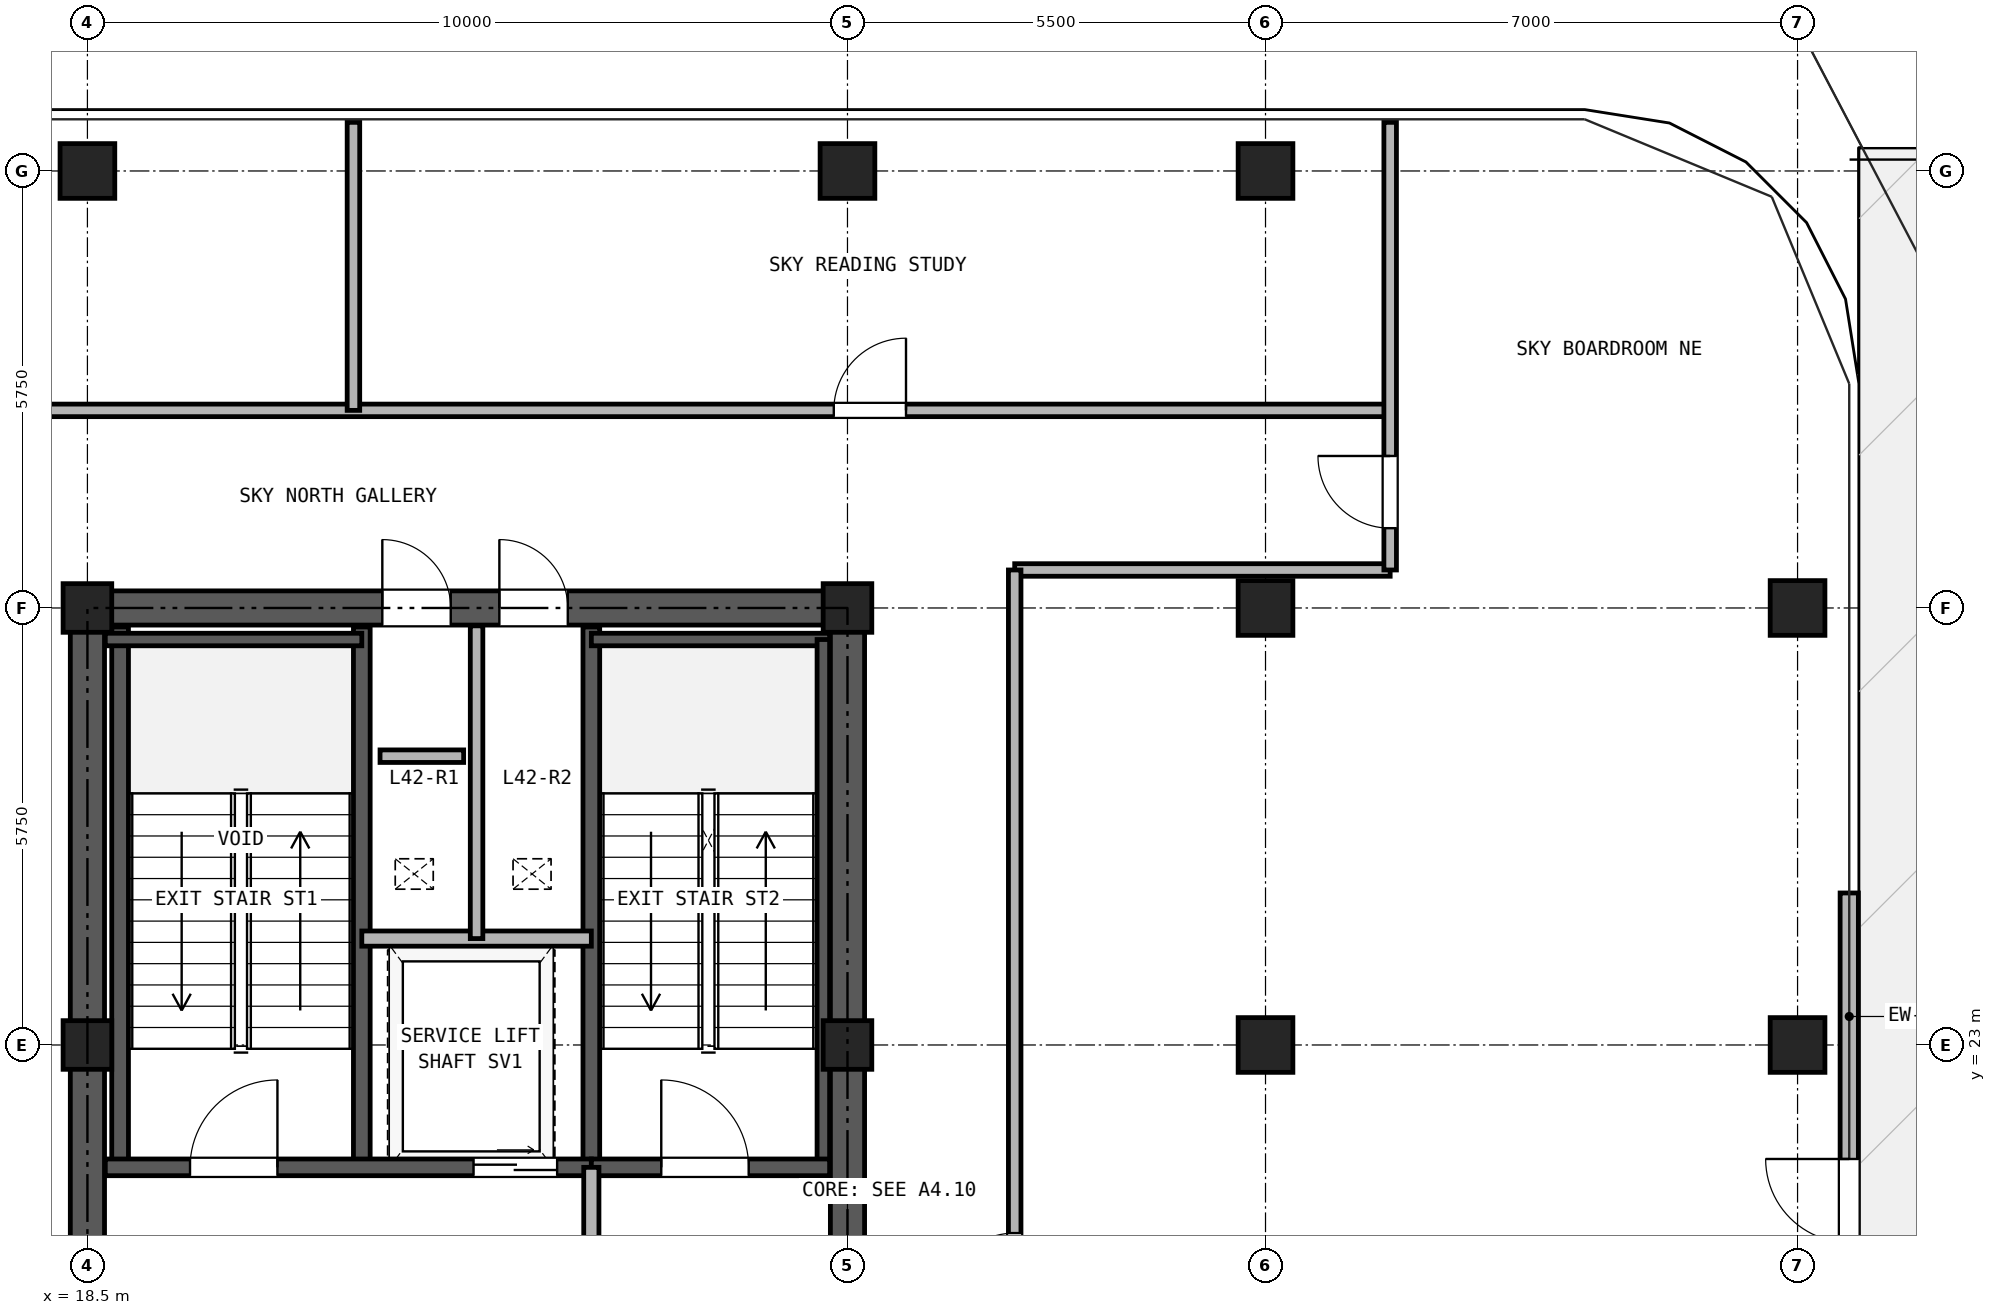
"""IFC4 building model, lengths in metres.
Left out: names, types, materials, properties, quantities, classifications, styles, units other than length and angle.
Written with IfcOpenShell. Run it as: python <this file> out.ifc"""

import sys

from ifc_helpers import new_model, si_unit, direction, frame, frame_2d, origin, origin_2d, place, context, subcontext, project, spatial, rectangle, hollow_rectangle, extrude, source, transform, mapped, element, fill, save


model = new_model("IFC4")
c1 = context("Model", 3, precision=1e-05, world=origin(), true_north=direction((0.0, 1.0)))
c2 = subcontext(c1, "Body", "Model", "MODEL_VIEW")
j1 = project(units=[si_unit("LENGTHUNIT", "METRE"), si_unit("PLANEANGLEUNIT", "RADIAN")], contexts=[c1])
p1 = place(None, origin())
s1 = spatial("IfcSite", under=j1, at=p1, CompositionType="ELEMENT")
p2 = place(p1, origin())
s2 = spatial("IfcBuilding", under=s1, at=p2, CompositionType="ELEMENT")
p3 = place(p2, frame((0.0, 0.0, 151.6)))
s3 = spatial("IfcBuildingStorey", under=s2, at=p3, CompositionType="ELEMENT", Elevation=151.6)
m1 = source(origin(), c2, "Body", "SweptSolid", [
    extrude(hollow_rectangle(XDim=0.72, YDim=0.72, WallThickness=0.04, at=origin_2d()), origin(), (0.0, 0.0, 1.0), 4.25),
])
for number, where, z_axis, x_axis in (
    (1, (18.5, 34.5, 0.0), (0.0, 0.0, 1.0), (1.0, 0.0, 0.0)),
    (2, (28.5, 34.5, 0.0), (0.0, 0.0, 1.0), (1.0, 0.0, 0.0)),
    (3, (34.0, 34.5, 0.0), (0.0, 0.0, 1.0), (1.0, 0.0, 0.0)),
    (4, (41.0, 23.0, 0.0), (0.0, 0.0, 1.0), (1.0, 0.0, 0.0)),
    (5, (41.0, 28.75, 0.0), (0.0, 0.0, 1.0), (1.0, 0.0, 0.0)),
):
    element("IfcColumn", number, at=place(p3, frame(where, z_axis=z_axis, x_axis=x_axis)), inside=s3, PredefinedType="COLUMN", context=c2, shape_type="MappedRepresentation", body=[
        mapped(m1, transform((0.0, 0.0, 0.0), x_axis=(1.0, 0.0, 0.0), y_axis=(0.0, 1.0, 0.0), z_axis=(0.0, 0.0, 1.0), scale=1.0)),
    ])
m2 = source(origin(), c2, "Body", "SweptSolid", [
    extrude(hollow_rectangle(XDim=0.64, YDim=0.64, WallThickness=0.035, at=origin_2d()), origin(), (0.0, 0.0, 1.0), 4.25),
])
for number, where, z_axis, x_axis in (
    (6, (18.5, 23.0, 0.0), (0.0, 0.0, 1.0), (1.0, 0.0, 0.0)),
    (7, (18.5, 28.75, 0.0), (0.0, 0.0, 1.0), (1.0, 0.0, 0.0)),
    (8, (28.5, 23.0, 0.0), (0.0, 0.0, 1.0), (1.0, 0.0, 0.0)),
    (9, (28.5, 28.75, 0.0), (0.0, 0.0, 1.0), (1.0, 0.0, 0.0)),
):
    element("IfcColumn", number, at=place(p3, frame(where, z_axis=z_axis, x_axis=x_axis)), inside=s3, PredefinedType="COLUMN", context=c2, shape_type="MappedRepresentation", body=[
        mapped(m2, transform((0.0, 0.0, 0.0), x_axis=(1.0, 0.0, 0.0), y_axis=(0.0, 1.0, 0.0), z_axis=(0.0, 0.0, 1.0), scale=1.0)),
    ])
for number, where, z_axis, x_axis in (
    (10, (34.0, 23.0, 0.0), (0.0, 0.0, 1.0), (1.0, 0.0, 0.0)),
    (11, (34.0, 28.75, 0.0), (0.0, 0.0, 1.0), (1.0, 0.0, 0.0)),
):
    element("IfcColumn", number, at=place(p3, frame(where, z_axis=z_axis, x_axis=x_axis)), inside=s3, PredefinedType="COLUMN", context=c2, shape_type="MappedRepresentation", body=[
        mapped(m1, transform((0.0, 0.0, 0.0), x_axis=(1.0, 0.0, 0.0), y_axis=(0.0, 1.0, 0.0), z_axis=(0.0, 0.0, 1.0), scale=1.0)),
    ])
p4 = place(p3, frame((41.68, 16.0, 0.0), z_axis=(0.0, 0.0, 1.0), x_axis=(0.0, 1.0, 0.0)))
e12 = element("IfcWall", 12, at=p4, inside=s3, PredefinedType="SOLIDWALL", context=c2, shape_type="SweptSolid", body=[
    extrude(rectangle(XDim=9.0, YDim=0.24, at=frame_2d((4.5, 0.0))), origin(), (0.0, 0.0, 1.0), 4.25),
])
p5 = place(p4, frame((1.8, 0.0, 0.0)))
e13 = element("IfcOpeningElement", 13, at=p5, cuts=e12, PredefinedType="OPENING", context=c2, shape_type="SweptSolid", body=[
    extrude(rectangle(XDim=1.1, YDim=2.2, at=frame_2d((0.55, 1.1))), frame((0.0, 0.13, 0.0), z_axis=(0.0, -1.0, 0.0), x_axis=(1.0, 0.0, 0.0)), (0.0, 0.0, 1.0), 0.26),
])
p6 = place(p4, frame((4.4, 0.0, 0.0)))
e14 = element("IfcOpeningElement", 14, at=p6, cuts=e12, PredefinedType="OPENING", context=c2, shape_type="SweptSolid", body=[
    extrude(rectangle(XDim=1.1, YDim=2.2, at=frame_2d((0.55, 1.1))), frame((0.0, 0.13, 0.0), z_axis=(0.0, -1.0, 0.0), x_axis=(1.0, 0.0, 0.0)), (0.0, 0.0, 1.0), 0.26),
])
p7 = place(p3, frame((18.275, 28.75, 0.0), z_axis=(0.0, 0.0, 1.0), x_axis=(1.0, 0.0, 0.0)))
e15 = element("IfcWall", 15, at=p7, inside=s3, PredefinedType="SHEAR", context=c2, shape_type="SweptSolid", body=[
    extrude(rectangle(XDim=10.45, YDim=0.45, at=frame_2d((5.225, 0.0))), origin(), (0.0, 0.0, 1.0), 4.25),
])
p8 = place(p7, frame((4.105, 0.0, 0.0)))
e16 = element("IfcOpeningElement", 16, at=p8, cuts=e15, PredefinedType="OPENING", context=c2, shape_type="SweptSolid", body=[
    extrude(rectangle(XDim=0.9, YDim=2.05, at=frame_2d((0.45, 1.025))), frame((0.0, 0.235, 0.0), z_axis=(0.0, -1.0, 0.0), x_axis=(1.0, 0.0, 0.0)), (0.0, 0.0, 1.0), 0.47),
])
p9 = place(p7, frame((5.645, 0.0, 0.0)))
e17 = element("IfcOpeningElement", 17, at=p9, cuts=e15, PredefinedType="OPENING", context=c2, shape_type="SweptSolid", body=[
    extrude(rectangle(XDim=0.9, YDim=2.05, at=frame_2d((0.45, 1.025))), frame((0.0, 0.235, 0.0), z_axis=(0.0, -1.0, 0.0), x_axis=(1.0, 0.0, 0.0)), (0.0, 0.0, 1.0), 0.47),
])
p10 = place(p3, frame((18.5, 11.725, 0.0), z_axis=(0.0, 0.0, 1.0), x_axis=(0.0, 1.0, 0.0)))
e18 = element("IfcWall", 18, at=p10, inside=s3, PredefinedType="SHEAR", context=c2, shape_type="SweptSolid", body=[
    extrude(rectangle(XDim=16.8, YDim=0.45, at=frame_2d((8.4, 0.0))), origin(), (0.0, 0.0, 1.0), 4.25),
])
p11 = place(p10, frame((7.425, 0.0, 0.0)))
e19 = element("IfcOpeningElement", 19, at=p11, cuts=e18, PredefinedType="OPENING", context=c2, shape_type="SweptSolid", body=[
    extrude(rectangle(XDim=1.15, YDim=2.2, at=frame_2d((0.575, 1.1))), frame((0.0, 0.235, 0.0), z_axis=(0.0, -1.0, 0.0), x_axis=(1.0, 0.0, 0.0)), (0.0, 0.0, 1.0), 0.47),
])
p12 = place(p3, frame((28.5, 11.725, 0.0), z_axis=(0.0, 0.0, 1.0), x_axis=(0.0, 1.0, 0.0)))
e20 = element("IfcWall", 20, at=p12, inside=s3, PredefinedType="SHEAR", context=c2, shape_type="SweptSolid", body=[
    extrude(rectangle(XDim=16.8, YDim=0.45, at=frame_2d((8.4, 0.0))), origin(), (0.0, 0.0, 1.0), 4.25),
])
p13 = place(p12, frame((7.425, 0.0, 0.0)))
e21 = element("IfcOpeningElement", 21, at=p13, cuts=e20, PredefinedType="OPENING", context=c2, shape_type="SweptSolid", body=[
    extrude(rectangle(XDim=1.15, YDim=2.2, at=frame_2d((0.575, 1.1))), frame((0.0, 0.235, 0.0), z_axis=(0.0, -1.0, 0.0), x_axis=(1.0, 0.0, 0.0)), (0.0, 0.0, 1.0), 0.47),
])
for number, where, z_axis, x_axis in (
    (22, (18.93, 21.39, 0.0), (0.0, 0.0, 1.0), (0.0, 1.0, 0.0)),
    (23, (22.11, 21.39, 0.0), (0.0, 0.0, 1.0), (0.0, 1.0, 0.0)),
    (24, (25.13, 21.39, 0.0), (0.0, 0.0, 1.0), (0.0, 1.0, 0.0)),
):
    element("IfcWall", number, at=place(p3, frame(where, z_axis=z_axis, x_axis=x_axis)), inside=s3, PredefinedType="SOLIDWALL", context=c2, shape_type="SweptSolid", body=[
        extrude(rectangle(XDim=7.11, YDim=0.22, at=frame_2d((3.555, 0.0))), origin(), (0.0, 0.0, 1.0), 4.25),
    ])
p14 = place(p3, frame((18.735, 28.335, 0.0), z_axis=(0.0, 0.0, 1.0), x_axis=(1.0, 0.0, 0.0)))
e25 = element("IfcWall", 25, at=p14, inside=s3, PredefinedType="PARTITIONING", context=c2, shape_type="SweptSolid", body=[
    extrude(rectangle(XDim=3.375, YDim=0.165, at=frame_2d((1.688, 0.0))), origin(), (0.0, 0.0, 1.0), 4.25),
])
p15 = place(p3, frame((25.13, 28.335, 0.0), z_axis=(0.0, 0.0, 1.0), x_axis=(1.0, 0.0, 0.0)))
e26 = element("IfcWall", 26, at=p15, inside=s3, PredefinedType="PARTITIONING", context=c2, shape_type="SweptSolid", body=[
    extrude(rectangle(XDim=3.135, YDim=0.165, at=frame_2d((1.567, 0.0))), origin(), (0.0, 0.0, 1.0), 4.25),
])
p16 = place(p3, frame((28.183, 21.39, 0.0), z_axis=(0.0, 0.0, 1.0), x_axis=(0.0, 1.0, 0.0)))
e27 = element("IfcWall", 27, at=p16, inside=s3, PredefinedType="PARTITIONING", context=c2, shape_type="SweptSolid", body=[
    extrude(rectangle(XDim=6.945, YDim=0.165, at=frame_2d((3.473, 0.0))), origin(), (0.0, 0.0, 1.0), 4.25),
])
p17 = place(p3, frame((18.735, 21.39, 0.0), z_axis=(0.0, 0.0, 1.0), x_axis=(1.0, 0.0, 0.0)))
e28 = element("IfcWall", 28, at=p17, inside=s3, PredefinedType="SOLIDWALL", context=c2, shape_type="SweptSolid", body=[
    extrude(rectangle(XDim=6.395, YDim=0.22, at=frame_2d((3.197, 0.0))), origin(), (0.0, 0.0, 1.0), 4.25),
])
p18 = place(p17, frame((1.115, 0.0, 0.0)))
e29 = element("IfcOpeningElement", 29, at=p18, cuts=e28, PredefinedType="OPENING", context=c2, shape_type="SweptSolid", body=[
    extrude(rectangle(XDim=1.15, YDim=2.2, at=frame_2d((0.575, 1.1))), frame((0.0, 0.12, 0.0), z_axis=(0.0, -1.0, 0.0), x_axis=(1.0, 0.0, 0.0)), (0.0, 0.0, 1.0), 0.24),
])
p19 = place(p17, frame((4.845, 0.0, 0.0)))
e30 = element("IfcOpeningElement", 30, at=p19, cuts=e28, PredefinedType="OPENING", context=c2, shape_type="SweptSolid", body=[
    extrude(rectangle(XDim=1.1, YDim=2.25, at=frame_2d((0.55, 1.125))), frame((0.0, 0.12, 0.0), z_axis=(0.0, -1.0, 0.0), x_axis=(1.0, 0.0, 0.0)), (0.0, 0.0, 1.0), 0.24),
])
p20 = place(p3, frame((25.13, 21.39, 0.0), z_axis=(0.0, 0.0, 1.0), x_axis=(1.0, 0.0, 0.0)))
e31 = element("IfcWall", 31, at=p20, inside=s3, PredefinedType="SOLIDWALL", context=c2, shape_type="SweptSolid", body=[
    extrude(rectangle(XDim=3.135, YDim=0.22, at=frame_2d((1.567, 0.0))), origin(), (0.0, 0.0, 1.0), 4.25),
])
p21 = place(p20, frame((0.92, 0.0, 0.0)))
e32 = element("IfcOpeningElement", 32, at=p21, cuts=e31, PredefinedType="OPENING", context=c2, shape_type="SweptSolid", body=[
    extrude(rectangle(XDim=1.15, YDim=2.2, at=frame_2d((0.575, 1.1))), frame((0.0, 0.12, 0.0), z_axis=(0.0, -1.0, 0.0), x_axis=(1.0, 0.0, 0.0)), (0.0, 0.0, 1.0), 0.24),
])
p22 = place(p3, frame((22.11, 24.4, 0.0), z_axis=(0.0, 0.0, 1.0), x_axis=(1.0, 0.0, 0.0)))
e33 = element("IfcWall", 33, at=p22, inside=s3, PredefinedType="PARTITIONING", context=c2, shape_type="SweptSolid", body=[
    extrude(rectangle(XDim=3.02, YDim=0.2, at=frame_2d((1.51, 0.0))), origin(), (0.0, 0.0, 1.0), 4.25),
])
p23 = place(p3, frame((23.62, 24.4, 0.0), z_axis=(0.0, 0.0, 1.0), x_axis=(0.0, 1.0, 0.0)))
e34 = element("IfcWall", 34, at=p23, inside=s3, PredefinedType="PARTITIONING", context=c2, shape_type="SweptSolid", body=[
    extrude(rectangle(XDim=4.115, YDim=0.165, at=frame_2d((2.058, 0.0))), origin(), (0.0, 0.0, 1.0), 4.25),
])
p24 = place(p3, frame((25.13, 18.0, 0.0), z_axis=(0.0, 0.0, 1.0), x_axis=(0.0, 1.0, 0.0)))
e35 = element("IfcWall", 35, at=p24, inside=s3, PredefinedType="PARTITIONING", context=c2, shape_type="SweptSolid", body=[
    extrude(rectangle(XDim=3.39, YDim=0.2, at=frame_2d((1.695, 0.0))), origin(), (0.0, 0.0, 1.0), 4.25),
])
p25 = place(p24, frame((1.1, 0.0, 0.0)))
e36 = element("IfcOpeningElement", 36, at=p25, cuts=e35, PredefinedType="OPENING", context=c2, shape_type="SweptSolid", body=[
    extrude(rectangle(XDim=1.15, YDim=2.2, at=frame_2d((0.575, 1.1))), frame((0.0, 0.11, 0.0), z_axis=(0.0, -1.0, 0.0), x_axis=(1.0, 0.0, 0.0)), (0.0, 0.0, 1.0), 0.22),
])
p26 = place(p3, frame((8.0, 31.35, 0.0), z_axis=(0.0, 0.0, 1.0), x_axis=(1.0, 0.0, 0.0)))
e37 = element("IfcWall", 37, at=p26, inside=s3, PredefinedType="PARTITIONING", context=c2, shape_type="SweptSolid", body=[
    extrude(rectangle(XDim=27.64, YDim=0.165, at=frame_2d((13.82, 0.0))), origin(), (0.0, 0.0, 1.0), 4.25),
])
p27 = place(p26, frame((6.5, 0.0, 0.0)))
e38 = element("IfcOpeningElement", 38, at=p27, cuts=e37, PredefinedType="OPENING", context=c2, shape_type="SweptSolid", body=[
    extrude(rectangle(XDim=1.0, YDim=2.15, at=frame_2d((0.5, 1.075))), frame((0.0, 0.093, 0.0), z_axis=(0.0, -1.0, 0.0), x_axis=(1.0, 0.0, 0.0)), (0.0, 0.0, 1.0), 0.185),
])
p28 = place(p26, frame((20.32, 0.0, 0.0)))
e39 = element("IfcOpeningElement", 39, at=p28, cuts=e37, PredefinedType="OPENING", context=c2, shape_type="SweptSolid", body=[
    extrude(rectangle(XDim=0.95, YDim=2.15, at=frame_2d((0.475, 1.075))), frame((0.0, 0.093, 0.0), z_axis=(0.0, -1.0, 0.0), x_axis=(1.0, 0.0, 0.0)), (0.0, 0.0, 1.0), 0.185),
])
p29 = place(p3, frame((30.7, 29.25, 0.0), z_axis=(0.0, 0.0, 1.0), x_axis=(1.0, 0.0, 0.0)))
e40 = element("IfcWall", 40, at=p29, inside=s3, PredefinedType="PARTITIONING", context=c2, shape_type="SweptSolid", body=[
    extrude(rectangle(XDim=4.94, YDim=0.165, at=frame_2d((2.47, 0.0))), origin(), (0.0, 0.0, 1.0), 4.25),
])
p30 = place(p3, frame((30.7, 10.9, 0.0), z_axis=(0.0, 0.0, 1.0), x_axis=(0.0, 1.0, 0.0)))
e41 = element("IfcWall", 41, at=p30, inside=s3, PredefinedType="PARTITIONING", context=c2, shape_type="SweptSolid", body=[
    extrude(rectangle(XDim=18.35, YDim=0.165, at=frame_2d((9.175, 0.0))), origin(), (0.0, 0.0, 1.0), 4.25),
])
p31 = place(p30, frame((8.675, 0.0, 0.0)))
e42 = element("IfcOpeningElement", 42, at=p31, cuts=e41, PredefinedType="OPENING", context=c2, shape_type="SweptSolid", body=[
    extrude(rectangle(XDim=0.95, YDim=2.15, at=frame_2d((0.475, 1.075))), frame((0.0, 0.093, 0.0), z_axis=(0.0, -1.0, 0.0), x_axis=(1.0, 0.0, 0.0)), (0.0, 0.0, 1.0), 0.185),
])
p32 = place(p3, frame((35.64, 29.25, 0.0), z_axis=(0.0, 0.0, 1.0), x_axis=(0.0, 1.0, 0.0)))
e43 = element("IfcWall", 43, at=p32, inside=s3, PredefinedType="PARTITIONING", context=c2, shape_type="SweptSolid", body=[
    extrude(rectangle(XDim=5.89, YDim=0.165, at=frame_2d((2.945, 0.0))), origin(), (0.0, 0.0, 1.0), 4.25),
])
p33 = place(p32, frame((0.55, 0.0, 0.0)))
e44 = element("IfcOpeningElement", 44, at=p33, cuts=e43, PredefinedType="OPENING", context=c2, shape_type="SweptSolid", body=[
    extrude(rectangle(XDim=0.95, YDim=2.15, at=frame_2d((0.475, 1.075))), frame((0.0, 0.093, 0.0), z_axis=(0.0, -1.0, 0.0), x_axis=(1.0, 0.0, 0.0)), (0.0, 0.0, 1.0), 0.185),
])
p34 = place(p3, frame((22.0, 31.35, 0.0), z_axis=(0.0, 0.0, 1.0), x_axis=(0.0, 1.0, 0.0)))
e45 = element("IfcWall", 45, at=p34, inside=s3, PredefinedType="PARTITIONING", context=c2, shape_type="SweptSolid", body=[
    extrude(rectangle(XDim=3.79, YDim=0.165, at=frame_2d((1.895, 0.0))), origin(), (0.0, 0.0, 1.0), 4.25),
])
p35 = place(p3, frame((22.35, 26.8, 0.0), z_axis=(0.0, 0.0, 1.0), x_axis=(1.0, 0.0, 0.0)))
e46 = element("IfcWall", 46, at=p35, inside=s3, PredefinedType="PARTITIONING", context=c2, shape_type="SweptSolid", body=[
    extrude(rectangle(XDim=1.1, YDim=0.165, at=frame_2d((0.55, 0.0))), origin(), (0.0, 0.0, 1.0), 4.25),
])
p36 = place(p6, frame((1.1, 0.0, 0.0), z_axis=(0.0, 0.0, 1.0), x_axis=(-1.0, 0.0, 0.0)))
e47 = element("IfcDoor", 47, at=p36, inside=s3, OperationType="SINGLE_SWING_RIGHT", PredefinedType="DOOR", context=c2, shape_type="SweptSolid", body=[
    extrude(rectangle(XDim=1.1, YDim=2.2, at=frame_2d((0.55, 1.1))), frame((0.0, 0.025, 0.0), z_axis=(0.0, -1.0, 0.0), x_axis=(1.0, 0.0, 0.0)), (0.0, 0.0, 1.0), 0.05),
])
fill(e14, e47)
p37 = place(p18, frame((1.15, 0.0, 0.0), z_axis=(0.0, 0.0, 1.0), x_axis=(-1.0, 0.0, 0.0)))
e48 = element("IfcDoor", 48, at=p37, inside=s3, OperationType="SINGLE_SWING_RIGHT", PredefinedType="DOOR", context=c2, shape_type="SweptSolid", body=[
    extrude(rectangle(XDim=1.15, YDim=2.2, at=frame_2d((0.575, 1.1))), frame((0.0, 0.025, 0.0), z_axis=(0.0, -1.0, 0.0), x_axis=(1.0, 0.0, 0.0)), (0.0, 0.0, 1.0), 0.05),
])
fill(e29, e48)
p38 = place(p21, frame((1.15, 0.0, 0.0), z_axis=(0.0, 0.0, 1.0), x_axis=(-1.0, 0.0, 0.0)))
e49 = element("IfcDoor", 49, at=p38, inside=s3, OperationType="SINGLE_SWING_LEFT", PredefinedType="DOOR", context=c2, shape_type="SweptSolid", body=[
    extrude(rectangle(XDim=1.15, YDim=2.2, at=frame_2d((0.575, 1.1))), frame((0.0, 0.025, 0.0), z_axis=(0.0, -1.0, 0.0), x_axis=(1.0, 0.0, 0.0)), (0.0, 0.0, 1.0), 0.05),
])
fill(e32, e49)
p39 = place(p19, frame((1.1, 0.0, 0.0), z_axis=(0.0, 0.0, 1.0), x_axis=(-1.0, 0.0, 0.0)))
e50 = element("IfcDoor", 50, at=p39, inside=s3, OperationType="DOUBLE_DOOR_SLIDING", PredefinedType="DOOR", context=c2, shape_type="SweptSolid", body=[
    extrude(rectangle(XDim=1.1, YDim=2.25, at=frame_2d((0.55, 1.125))), frame((0.0, 0.025, 0.0), z_axis=(0.0, -1.0, 0.0), x_axis=(1.0, 0.0, 0.0)), (0.0, 0.0, 1.0), 0.05),
])
fill(e30, e50)
p40 = place(p8, origin())
e51 = element("IfcDoor", 51, at=p40, inside=s3, OperationType="SINGLE_SWING_LEFT", PredefinedType="DOOR", context=c2, shape_type="SweptSolid", body=[
    extrude(rectangle(XDim=0.9, YDim=2.05, at=frame_2d((0.45, 1.025))), frame((0.0, 0.025, 0.0), z_axis=(0.0, -1.0, 0.0), x_axis=(1.0, 0.0, 0.0)), (0.0, 0.0, 1.0), 0.05),
])
fill(e16, e51)
p41 = place(p9, origin())
e52 = element("IfcDoor", 52, at=p41, inside=s3, OperationType="SINGLE_SWING_LEFT", PredefinedType="DOOR", context=c2, shape_type="SweptSolid", body=[
    extrude(rectangle(XDim=0.9, YDim=2.05, at=frame_2d((0.45, 1.025))), frame((0.0, 0.025, 0.0), z_axis=(0.0, -1.0, 0.0), x_axis=(1.0, 0.0, 0.0)), (0.0, 0.0, 1.0), 0.05),
])
fill(e17, e52)
p42 = place(p28, origin())
e53 = element("IfcDoor", 53, at=p42, inside=s3, OperationType="SINGLE_SWING_RIGHT", PredefinedType="DOOR", context=c2, shape_type="SweptSolid", body=[
    extrude(rectangle(XDim=0.95, YDim=2.15, at=frame_2d((0.475, 1.075))), frame((0.0, 0.025, 0.0), z_axis=(0.0, -1.0, 0.0), x_axis=(1.0, 0.0, 0.0)), (0.0, 0.0, 1.0), 0.05),
])
fill(e39, e53)
p43 = place(p33, origin())
e54 = element("IfcDoor", 54, at=p43, inside=s3, OperationType="SINGLE_SWING_RIGHT", PredefinedType="DOOR", context=c2, shape_type="SweptSolid", body=[
    extrude(rectangle(XDim=0.95, YDim=2.15, at=frame_2d((0.475, 1.075))), frame((0.0, 0.025, 0.0), z_axis=(0.0, -1.0, 0.0), x_axis=(1.0, 0.0, 0.0)), (0.0, 0.0, 1.0), 0.05),
])
fill(e44, e54)
p44 = place(p31, origin())
e55 = element("IfcDoor", 55, at=p44, inside=s3, OperationType="SINGLE_SWING_LEFT", PredefinedType="DOOR", context=c2, shape_type="SweptSolid", body=[
    extrude(rectangle(XDim=0.95, YDim=2.15, at=frame_2d((0.475, 1.075))), frame((0.0, 0.025, 0.0), z_axis=(0.0, -1.0, 0.0), x_axis=(1.0, 0.0, 0.0)), (0.0, 0.0, 1.0), 0.05),
])
fill(e42, e55)
save(model, sys.argv[1])
